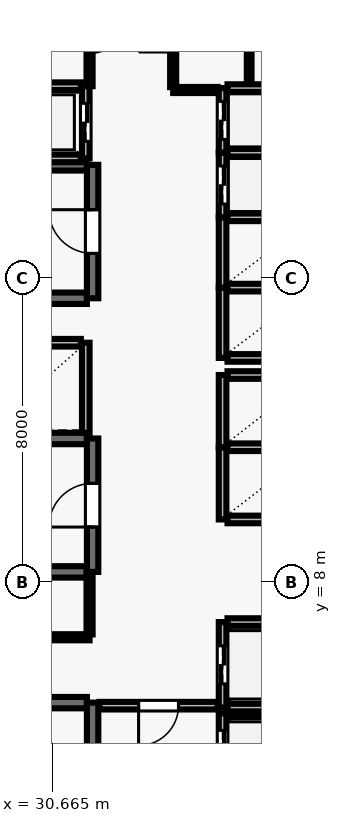
"""IFC4 building model, lengths in metres.
Left out: names, types, materials, properties, quantities, classifications, styles, units other than length and angle.
Written with IfcOpenShell. Run it as: python <this file> out.ifc"""

import sys

from ifc_helpers import new_model, si_unit, direction, frame, frame_2d, origin, place, context, subcontext, project, spatial, rectangle, extrude, element, fill, save


model = new_model("IFC4")
c1 = context("Model", 3, precision=1e-05, world=origin(), true_north=direction((0.0, 1.0)))
c2 = subcontext(c1, "Body", "Model", "MODEL_VIEW")
j1 = project(units=[si_unit("LENGTHUNIT", "METRE"), si_unit("PLANEANGLEUNIT", "RADIAN")], contexts=[c1])
p1 = place(None, origin())
s1 = spatial("IfcSite", under=j1, at=p1, CompositionType="ELEMENT")
p2 = place(p1, origin())
s2 = spatial("IfcBuilding", under=s1, at=p2, CompositionType="ELEMENT")
p3 = place(p2, frame((0.0, 0.0, 134.6)))
s3 = spatial("IfcBuildingStorey", under=s2, at=p3, CompositionType="ELEMENT", Elevation=134.6)
p4 = place(p3, frame((31.58, 4.83, 0.0), z_axis=(0.0, 0.0, 1.0), x_axis=(-1.0, 0.0, 0.0)))
e1 = element("IfcWall", 1, at=p4, inside=s3, PredefinedType="SHEAR", context=c2, shape_type="SweptSolid", body=[
    extrude(rectangle(XDim=8.36, YDim=0.3, at=frame_2d((4.18, 0.0))), origin(), (0.0, 0.0, 1.0), 3.69),
])
p5 = place(p3, frame((31.73, 0.96, 0.0), z_axis=(0.0, 0.0, 1.0), x_axis=(0.0, 1.0, 0.0)))
e2 = element("IfcWall", 2, at=p5, inside=s3, PredefinedType="SHEAR", context=c2, shape_type="SweptSolid", body=[
    extrude(rectangle(XDim=3.87, YDim=0.3, at=frame_2d((1.935, 0.0))), origin(), (0.0, 0.0, 1.0), 3.69),
])
p6 = place(p5, frame((1.54, 0.0, 0.0)))
e3 = element("IfcOpeningElement", 3, at=p6, cuts=e2, PredefinedType="OPENING", context=c2, shape_type="SweptSolid", body=[
    extrude(rectangle(XDim=1.15, YDim=2.15, at=frame_2d((0.575, 1.075))), frame((0.0, 0.16, 0.0), z_axis=(0.0, -1.0, 0.0), x_axis=(1.0, 0.0, 0.0)), (0.0, 0.0, 1.0), 0.32),
])
for number, where, z_axis, x_axis in (
    (4, (31.58, 18.98, 0.0), (0.0, 0.0, 1.0), (-1.0, 0.0, 0.0)),
    (5, (23.22, 15.47, 0.0), (0.0, 0.0, 1.0), (1.0, 0.0, 0.0)),
):
    element("IfcWall", number, at=place(p3, frame(where, z_axis=z_axis, x_axis=x_axis)), inside=s3, PredefinedType="SHEAR", context=c2, shape_type="SweptSolid", body=[
        extrude(rectangle(XDim=8.36, YDim=0.3, at=frame_2d((4.18, 0.0))), origin(), (0.0, 0.0, 1.0), 3.69),
    ])
p7 = place(p3, frame((31.73, 15.47, 0.0), z_axis=(0.0, 0.0, 1.0), x_axis=(0.0, 1.0, 0.0)))
e6 = element("IfcWall", 6, at=p7, inside=s3, PredefinedType="SHEAR", context=c2, shape_type="SweptSolid", body=[
    extrude(rectangle(XDim=3.51, YDim=0.3, at=frame_2d((1.755, 0.0))), origin(), (0.0, 0.0, 1.0), 3.69),
])
p8 = place(p7, frame((1.18, 0.0, 0.0)))
e7 = element("IfcOpeningElement", 7, at=p8, cuts=e6, PredefinedType="OPENING", context=c2, shape_type="SweptSolid", body=[
    extrude(rectangle(XDim=1.15, YDim=2.15, at=frame_2d((0.575, 1.075))), frame((0.0, 0.16, 0.0), z_axis=(0.0, -1.0, 0.0), x_axis=(1.0, 0.0, 0.0)), (0.0, 0.0, 1.0), 0.32),
])
for number, where, z_axis, x_axis in (
    (8, (31.58, 11.78, 0.0), (0.0, 0.0, 1.0), (-1.0, 0.0, 0.0)),
    (9, (23.22, 8.27, 0.0), (0.0, 0.0, 1.0), (1.0, 0.0, 0.0)),
):
    element("IfcWall", number, at=place(p3, frame(where, z_axis=z_axis, x_axis=x_axis)), inside=s3, PredefinedType="SHEAR", context=c2, shape_type="SweptSolid", body=[
        extrude(rectangle(XDim=8.36, YDim=0.3, at=frame_2d((4.18, 0.0))), origin(), (0.0, 0.0, 1.0), 3.69),
    ])
p9 = place(p3, frame((31.73, 8.27, 0.0), z_axis=(0.0, 0.0, 1.0), x_axis=(0.0, 1.0, 0.0)))
e10 = element("IfcWall", 10, at=p9, inside=s3, PredefinedType="SHEAR", context=c2, shape_type="SweptSolid", body=[
    extrude(rectangle(XDim=3.51, YDim=0.3, at=frame_2d((1.755, 0.0))), origin(), (0.0, 0.0, 1.0), 3.69),
])
p10 = place(p9, frame((1.18, 0.0, 0.0)))
e11 = element("IfcOpeningElement", 11, at=p10, cuts=e10, PredefinedType="OPENING", context=c2, shape_type="SweptSolid", body=[
    extrude(rectangle(XDim=1.15, YDim=2.15, at=frame_2d((0.575, 1.075))), frame((0.0, 0.16, 0.0), z_axis=(0.0, -1.0, 0.0), x_axis=(1.0, 0.0, 0.0)), (0.0, 0.0, 1.0), 0.32),
])
p11 = place(p3, frame((35.15, 4.55, 0.0), z_axis=(0.0, 0.0, 1.0), x_axis=(0.0, -1.0, 0.0)))
e12 = element("IfcWall", 12, at=p11, inside=s3, PredefinedType="SOLIDWALL", context=c2, shape_type="SweptSolid", body=[
    extrude(rectangle(XDim=2.1, YDim=0.2, at=frame_2d((1.05, 0.0))), origin(), (0.0, 0.0, 1.0), 3.69),
])
p12 = place(p11, frame((0.45, 0.0, 0.0)))
e13 = element("IfcOpeningElement", 13, at=p12, cuts=e12, PredefinedType="OPENING", context=c2, shape_type="SweptSolid", body=[
    extrude(rectangle(XDim=1.2, YDim=2.15, at=frame_2d((0.6, 1.075))), frame((0.0, 0.11, 0.0), z_axis=(0.0, -1.0, 0.0), x_axis=(1.0, 0.0, 0.0)), (0.0, 0.0, 1.0), 0.22),
])
p13 = place(p3, frame((37.42, 4.55, 0.0), z_axis=(0.0, 0.0, 1.0), x_axis=(-1.0, 0.0, 0.0)))
e14 = element("IfcWall", 14, at=p13, inside=s3, PredefinedType="SOLIDWALL", context=c2, shape_type="SweptSolid", body=[
    extrude(rectangle(XDim=2.14, YDim=0.2, at=frame_2d((1.07, 0.0))), origin(), (0.0, 0.0, 1.0), 3.69),
])
p14 = place(p3, frame((35.15, 6.95, 0.0), z_axis=(0.0, 0.0, 1.0), x_axis=(0.0, -1.0, 0.0)))
e15 = element("IfcWall", 15, at=p14, inside=s3, PredefinedType="SOLIDWALL", context=c2, shape_type="SweptSolid", body=[
    extrude(rectangle(XDim=2.25, YDim=0.2, at=frame_2d((1.125, 0.0))), origin(), (0.0, 0.0, 1.0), 3.69),
])
p15 = place(p14, frame((0.625, 0.0, 0.0)))
e16 = element("IfcOpeningElement", 16, at=p15, cuts=e15, PredefinedType="OPENING", context=c2, shape_type="SweptSolid", body=[
    extrude(rectangle(XDim=1.0, YDim=2.1, at=frame_2d((0.5, 1.05))), frame((0.0, 0.11, 0.0), z_axis=(0.0, -1.0, 0.0), x_axis=(1.0, 0.0, 0.0)), (0.0, 0.0, 1.0), 0.22),
])
for number, where, z_axis, x_axis in (
    (17, (35.28, 4.7, 0.0), (0.0, 0.0, 1.0), (1.0, 0.0, 0.0)),
    (18, (37.42, 6.95, 0.0), (0.0, 0.0, 1.0), (-1.0, 0.0, 0.0)),
):
    element("IfcWall", number, at=place(p3, frame(where, z_axis=z_axis, x_axis=x_axis)), inside=s3, PredefinedType="SOLIDWALL", context=c2, shape_type="SweptSolid", body=[
        extrude(rectangle(XDim=2.14, YDim=0.2, at=frame_2d((1.07, 0.0))), origin(), (0.0, 0.0, 1.0), 3.69),
    ])
p16 = place(p3, frame((35.15, 11.55, 0.0), z_axis=(0.0, 0.0, 1.0), x_axis=(0.0, -1.0, 0.0)))
e19 = element("IfcWall", 19, at=p16, inside=s3, PredefinedType="SOLIDWALL", context=c2, shape_type="SweptSolid", body=[
    extrude(rectangle(XDim=1.9, YDim=0.2, at=frame_2d((0.95, 0.0))), origin(), (0.0, 0.0, 1.0), 3.69),
])
for number, where, z_axis, x_axis in (
    (20, (35.28, 9.65, 0.0), (0.0, 0.0, 1.0), (1.0, 0.0, 0.0)),
    (21, (37.42, 11.55, 0.0), (0.0, 0.0, 1.0), (-1.0, 0.0, 0.0)),
):
    element("IfcWall", number, at=place(p3, frame(where, z_axis=z_axis, x_axis=x_axis)), inside=s3, PredefinedType="SOLIDWALL", context=c2, shape_type="SweptSolid", body=[
        extrude(rectangle(XDim=2.14, YDim=0.2, at=frame_2d((1.07, 0.0))), origin(), (0.0, 0.0, 1.0), 3.69),
    ])
p17 = place(p3, frame((35.15, 13.45, 0.0), z_axis=(0.0, 0.0, 1.0), x_axis=(0.0, -1.0, 0.0)))
e22 = element("IfcWall", 22, at=p17, inside=s3, PredefinedType="SOLIDWALL", context=c2, shape_type="SweptSolid", body=[
    extrude(rectangle(XDim=1.9, YDim=0.2, at=frame_2d((0.95, 0.0))), origin(), (0.0, 0.0, 1.0), 3.69),
])
p18 = place(p3, frame((37.42, 13.45, 0.0), z_axis=(0.0, 0.0, 1.0), x_axis=(-1.0, 0.0, 0.0)))
e23 = element("IfcWall", 23, at=p18, inside=s3, PredefinedType="SOLIDWALL", context=c2, shape_type="SweptSolid", body=[
    extrude(rectangle(XDim=2.14, YDim=0.2, at=frame_2d((1.07, 0.0))), origin(), (0.0, 0.0, 1.0), 3.69),
])
p19 = place(p3, frame((31.55, 11.93, 0.0), z_axis=(0.0, 0.0, 1.0), x_axis=(0.0, 1.0, 0.0)))
e24 = element("IfcWall", 24, at=p19, inside=s3, PredefinedType="SOLIDWALL", context=c2, shape_type="SweptSolid", body=[
    extrude(rectangle(XDim=2.37, YDim=0.2, at=frame_2d((1.185, 0.0))), origin(), (0.0, 0.0, 1.0), 3.69),
])
p20 = place(p3, frame((31.42, 14.3, 0.0), z_axis=(0.0, 0.0, 1.0), x_axis=(-1.0, 0.0, 0.0)))
e25 = element("IfcWall", 25, at=p20, inside=s3, PredefinedType="SOLIDWALL", context=c2, shape_type="SweptSolid", body=[
    extrude(rectangle(XDim=2.44, YDim=0.2, at=frame_2d((1.22, 0.0))), origin(), (0.0, 0.0, 1.0), 3.69),
])
p21 = place(p3, frame((35.15, 15.75, 0.0), z_axis=(0.0, 0.0, 1.0), x_axis=(0.0, -1.0, 0.0)))
e26 = element("IfcWall", 26, at=p21, inside=s3, PredefinedType="SOLIDWALL", context=c2, shape_type="SweptSolid", body=[
    extrude(rectangle(XDim=1.85, YDim=0.2, at=frame_2d((0.925, 0.0))), origin(), (0.0, 0.0, 1.0), 3.69),
])
for number, where, z_axis, x_axis in (
    (27, (35.28, 13.9, 0.0), (0.0, 0.0, 1.0), (1.0, 0.0, 0.0)),
    (28, (37.42, 15.75, 0.0), (0.0, 0.0, 1.0), (-1.0, 0.0, 0.0)),
):
    element("IfcWall", number, at=place(p3, frame(where, z_axis=z_axis, x_axis=x_axis)), inside=s3, PredefinedType="SOLIDWALL", context=c2, shape_type="SweptSolid", body=[
        extrude(rectangle(XDim=2.14, YDim=0.2, at=frame_2d((1.07, 0.0))), origin(), (0.0, 0.0, 1.0), 3.69),
    ])
p22 = place(p3, frame((35.15, 17.6, 0.0), z_axis=(0.0, 0.0, 1.0), x_axis=(0.0, -1.0, 0.0)))
e29 = element("IfcWall", 29, at=p22, inside=s3, PredefinedType="SOLIDWALL", context=c2, shape_type="SweptSolid", body=[
    extrude(rectangle(XDim=1.85, YDim=0.2, at=frame_2d((0.925, 0.0))), origin(), (0.0, 0.0, 1.0), 3.69),
])
p23 = place(p3, frame((37.42, 17.6, 0.0), z_axis=(0.0, 0.0, 1.0), x_axis=(-1.0, 0.0, 0.0)))
e30 = element("IfcWall", 30, at=p23, inside=s3, PredefinedType="SOLIDWALL", context=c2, shape_type="SweptSolid", body=[
    extrude(rectangle(XDim=2.14, YDim=0.2, at=frame_2d((1.07, 0.0))), origin(), (0.0, 0.0, 1.0), 3.69),
])
p24 = place(p3, frame((35.15, 19.3, 0.0), z_axis=(0.0, 0.0, 1.0), x_axis=(0.0, -1.0, 0.0)))
e31 = element("IfcWall", 31, at=p24, inside=s3, PredefinedType="SOLIDWALL", context=c2, shape_type="SweptSolid", body=[
    extrude(rectangle(XDim=1.7, YDim=0.2, at=frame_2d((0.85, 0.0))), origin(), (0.0, 0.0, 1.0), 3.69),
])
p25 = place(p24, frame((0.35, 0.0, 0.0)))
e32 = element("IfcOpeningElement", 32, at=p25, cuts=e31, PredefinedType="OPENING", context=c2, shape_type="SweptSolid", body=[
    extrude(rectangle(XDim=1.0, YDim=2.1, at=frame_2d((0.5, 1.05))), frame((0.0, 0.11, 0.0), z_axis=(0.0, -1.0, 0.0), x_axis=(1.0, 0.0, 0.0)), (0.0, 0.0, 1.0), 0.22),
])
p26 = place(p3, frame((37.42, 19.3, 0.0), z_axis=(0.0, 0.0, 1.0), x_axis=(-1.0, 0.0, 0.0)))
e33 = element("IfcWall", 33, at=p26, inside=s3, PredefinedType="SOLIDWALL", context=c2, shape_type="SweptSolid", body=[
    extrude(rectangle(XDim=2.14, YDim=0.2, at=frame_2d((1.07, 0.0))), origin(), (0.0, 0.0, 1.0), 3.69),
])
p27 = place(p3, frame((35.15, 21.0, 0.0), z_axis=(0.0, 0.0, 1.0), x_axis=(0.0, -1.0, 0.0)))
e34 = element("IfcWall", 34, at=p27, inside=s3, PredefinedType="SOLIDWALL", context=c2, shape_type="SweptSolid", body=[
    extrude(rectangle(XDim=1.7, YDim=0.2, at=frame_2d((0.85, 0.0))), origin(), (0.0, 0.0, 1.0), 3.69),
])
p28 = place(p27, frame((0.35, 0.0, 0.0)))
e35 = element("IfcOpeningElement", 35, at=p28, cuts=e34, PredefinedType="OPENING", context=c2, shape_type="SweptSolid", body=[
    extrude(rectangle(XDim=1.0, YDim=2.1, at=frame_2d((0.5, 1.05))), frame((0.0, 0.11, 0.0), z_axis=(0.0, -1.0, 0.0), x_axis=(1.0, 0.0, 0.0)), (0.0, 0.0, 1.0), 0.22),
])
p29 = place(p3, frame((37.42, 21.0, 0.0), z_axis=(0.0, 0.0, 1.0), x_axis=(-1.0, 0.0, 0.0)))
e36 = element("IfcWall", 36, at=p29, inside=s3, PredefinedType="SOLIDWALL", context=c2, shape_type="SweptSolid", body=[
    extrude(rectangle(XDim=2.14, YDim=0.2, at=frame_2d((1.07, 0.0))), origin(), (0.0, 0.0, 1.0), 3.69),
])
p30 = place(p3, frame((31.55, 19.15, 0.0), z_axis=(0.0, 0.0, 1.0), x_axis=(0.0, 1.0, 0.0)))
e37 = element("IfcWall", 37, at=p30, inside=s3, PredefinedType="SOLIDWALL", context=c2, shape_type="SweptSolid", body=[
    extrude(rectangle(XDim=1.9, YDim=0.2, at=frame_2d((0.95, 0.0))), origin(), (0.0, 0.0, 1.0), 3.69),
])
p31 = place(p30, frame((0.45, 0.0, 0.0)))
e38 = element("IfcOpeningElement", 38, at=p31, cuts=e37, PredefinedType="OPENING", context=c2, shape_type="SweptSolid", body=[
    extrude(rectangle(XDim=1.0, YDim=2.1, at=frame_2d((0.5, 1.05))), frame((0.0, 0.11, 0.0), z_axis=(0.0, -1.0, 0.0), x_axis=(1.0, 0.0, 0.0)), (0.0, 0.0, 1.0), 0.22),
])
for number, where, z_axis, x_axis in (
    (39, (28.98, 19.15, 0.0), (0.0, 0.0, 1.0), (1.0, 0.0, 0.0)),
    (40, (31.42, 21.05, 0.0), (0.0, 0.0, 1.0), (-1.0, 0.0, 0.0)),
):
    element("IfcWall", number, at=place(p3, frame(where, z_axis=z_axis, x_axis=x_axis)), inside=s3, PredefinedType="SOLIDWALL", context=c2, shape_type="SweptSolid", body=[
        extrude(rectangle(XDim=2.44, YDim=0.2, at=frame_2d((1.22, 0.0))), origin(), (0.0, 0.0, 1.0), 3.69),
    ])
p32 = place(p3, frame((31.65, 6.55, 0.0), z_axis=(0.0, 0.0, 1.0), x_axis=(-1.0, 0.0, 0.0)))
e41 = element("IfcWall", 41, at=p32, inside=s3, PredefinedType="PARTITIONING", context=c2, shape_type="SweptSolid", body=[
    extrude(rectangle(XDim=4.75, YDim=0.16, at=frame_2d((2.375, 0.0))), origin(), (0.0, 0.0, 1.0), 3.69),
])
p33 = place(p32, frame((1.935, 0.0, 0.0)))
e42 = element("IfcOpeningElement", 42, at=p33, cuts=e41, PredefinedType="OPENING", context=c2, shape_type="SweptSolid", body=[
    extrude(rectangle(XDim=0.88, YDim=2.1, at=frame_2d((0.44, 1.05))), frame((0.0, 0.09, 0.0), z_axis=(0.0, -1.0, 0.0), x_axis=(1.0, 0.0, 0.0)), (0.0, 0.0, 1.0), 0.18),
])
p34 = place(p3, frame((35.02, 4.75, 0.0), z_axis=(0.0, 0.0, 1.0), x_axis=(-1.0, 0.0, 0.0)))
e43 = element("IfcWall", 43, at=p34, inside=s3, PredefinedType="SOLIDWALL", context=c2, shape_type="SweptSolid", body=[
    extrude(rectangle(XDim=3.11, YDim=0.2, at=frame_2d((1.555, 0.0))), origin(), (0.0, 0.0, 1.0), 3.69),
])
p35 = place(p34, frame((1.03, 0.0, 0.0)))
e44 = element("IfcOpeningElement", 44, at=p35, cuts=e43, PredefinedType="OPENING", context=c2, shape_type="SweptSolid", body=[
    extrude(rectangle(XDim=1.05, YDim=2.15, at=frame_2d((0.525, 1.075))), frame((0.0, 0.11, 0.0), z_axis=(0.0, -1.0, 0.0), x_axis=(1.0, 0.0, 0.0)), (0.0, 0.0, 1.0), 0.22),
])
p36 = place(p3, frame((35.02, 20.95, 0.0), z_axis=(0.0, 0.0, 1.0), x_axis=(-1.0, 0.0, 0.0)))
e45 = element("IfcWall", 45, at=p36, inside=s3, PredefinedType="PARTITIONING", context=c2, shape_type="SweptSolid", body=[
    extrude(rectangle(XDim=1.17, YDim=0.16, at=frame_2d((0.585, 0.0))), origin(), (0.0, 0.0, 1.0), 3.69),
])
p37 = place(p3, frame((31.65, 8.24, 0.0), z_axis=(0.0, 0.0, 1.0), x_axis=(0.0, -1.0, 0.0)))
e46 = element("IfcWall", 46, at=p37, inside=s3, PredefinedType="PARTITIONING", context=c2, shape_type="SweptSolid", body=[
    extrude(rectangle(XDim=1.615, YDim=0.16, at=frame_2d((0.808, 0.0))), origin(), (0.0, 0.0, 1.0), 3.69),
])
p38 = place(p3, frame((31.65, 23.775, 0.0), z_axis=(0.0, 0.0, 1.0), x_axis=(0.0, -1.0, 0.0)))
e47 = element("IfcWall", 47, at=p38, inside=s3, PredefinedType="PARTITIONING", context=c2, shape_type="SweptSolid", body=[
    extrude(rectangle(XDim=2.725, YDim=0.16, at=frame_2d((1.362, 0.0))), origin(), (0.0, 0.0, 1.0), 3.69),
])
p39 = place(p38, frame((0.862, 0.0, 0.0)))
e48 = element("IfcOpeningElement", 48, at=p39, cuts=e47, PredefinedType="OPENING", context=c2, shape_type="SweptSolid", body=[
    extrude(rectangle(XDim=1.0, YDim=2.1, at=frame_2d((0.5, 1.05))), frame((0.0, 0.09, 0.0), z_axis=(0.0, -1.0, 0.0), x_axis=(1.0, 0.0, 0.0)), (0.0, 0.0, 1.0), 0.18),
])
p40 = place(p3, frame((33.85, 21.025, 0.0), z_axis=(0.0, 0.0, 1.0), x_axis=(0.0, 1.0, 0.0)))
e49 = element("IfcWall", 49, at=p40, inside=s3, PredefinedType="PARTITIONING", context=c2, shape_type="SweptSolid", body=[
    extrude(rectangle(XDim=2.75, YDim=0.16, at=frame_2d((1.375, 0.0))), origin(), (0.0, 0.0, 1.0), 3.69),
])
p41 = place(p40, frame((0.925, 0.0, 0.0)))
e50 = element("IfcOpeningElement", 50, at=p41, cuts=e49, PredefinedType="OPENING", context=c2, shape_type="SweptSolid", body=[
    extrude(rectangle(XDim=0.9, YDim=2.1, at=frame_2d((0.45, 1.05))), frame((0.0, 0.09, 0.0), z_axis=(0.0, -1.0, 0.0), x_axis=(1.0, 0.0, 0.0)), (0.0, 0.0, 1.0), 0.18),
])
p42 = place(p3, frame((35.85, 21.13, 0.0), z_axis=(0.0, 0.0, 1.0), x_axis=(0.0, 1.0, 0.0)))
e51 = element("IfcWall", 51, at=p42, inside=s3, PredefinedType="PARTITIONING", context=c2, shape_type="SweptSolid", body=[
    extrude(rectangle(XDim=2.645, YDim=0.125, at=frame_2d((1.323, 0.0))), origin(), (0.0, 0.0, 1.0), 3.69),
])
p43 = place(p42, frame((0.872, 0.0, 0.0)))
e52 = element("IfcOpeningElement", 52, at=p43, cuts=e51, PredefinedType="OPENING", context=c2, shape_type="SweptSolid", body=[
    extrude(rectangle(XDim=0.9, YDim=2.1, at=frame_2d((0.45, 1.05))), frame((0.0, 0.073, 0.0), z_axis=(0.0, -1.0, 0.0), x_axis=(1.0, 0.0, 0.0)), (0.0, 0.0, 1.0), 0.145),
])
p44 = place(p8, origin())
e53 = element("IfcDoor", 53, at=p44, inside=s3, OperationType="SINGLE_SWING_RIGHT", PredefinedType="DOOR", context=c2, shape_type="SweptSolid", body=[
    extrude(rectangle(XDim=1.15, YDim=2.15, at=frame_2d((0.575, 1.075))), frame((0.0, 0.025, 0.0), z_axis=(0.0, -1.0, 0.0), x_axis=(1.0, 0.0, 0.0)), (0.0, 0.0, 1.0), 0.05),
])
fill(e7, e53)
p45 = place(p10, origin())
e54 = element("IfcDoor", 54, at=p45, inside=s3, OperationType="SINGLE_SWING_LEFT", PredefinedType="DOOR", context=c2, shape_type="SweptSolid", body=[
    extrude(rectangle(XDim=1.15, YDim=2.15, at=frame_2d((0.575, 1.075))), frame((0.0, 0.025, 0.0), z_axis=(0.0, -1.0, 0.0), x_axis=(1.0, 0.0, 0.0)), (0.0, 0.0, 1.0), 0.05),
])
fill(e11, e54)
p46 = place(p12, origin())
e55 = element("IfcDoor", 55, at=p46, inside=s3, OperationType="DOUBLE_DOOR_SLIDING", PredefinedType="DOOR", context=c2, shape_type="SweptSolid", body=[
    extrude(rectangle(XDim=1.2, YDim=2.15, at=frame_2d((0.6, 1.075))), frame((0.0, 0.025, 0.0), z_axis=(0.0, -1.0, 0.0), x_axis=(1.0, 0.0, 0.0)), (0.0, 0.0, 1.0), 0.05),
])
fill(e13, e55)
p47 = place(p15, origin())
e56 = element("IfcDoor", 56, at=p47, inside=s3, OperationType="DOUBLE_DOOR_SLIDING", PredefinedType="DOOR", context=c2, shape_type="SweptSolid", body=[
    extrude(rectangle(XDim=1.0, YDim=2.1, at=frame_2d((0.5, 1.05))), frame((0.0, 0.025, 0.0), z_axis=(0.0, -1.0, 0.0), x_axis=(1.0, 0.0, 0.0)), (0.0, 0.0, 1.0), 0.05),
])
fill(e16, e56)
p48 = place(p25, origin())
e57 = element("IfcDoor", 57, at=p48, inside=s3, OperationType="DOUBLE_DOOR_SLIDING", PredefinedType="DOOR", context=c2, shape_type="SweptSolid", body=[
    extrude(rectangle(XDim=1.0, YDim=2.1, at=frame_2d((0.5, 1.05))), frame((0.0, 0.025, 0.0), z_axis=(0.0, -1.0, 0.0), x_axis=(1.0, 0.0, 0.0)), (0.0, 0.0, 1.0), 0.05),
])
fill(e32, e57)
p49 = place(p28, origin())
e58 = element("IfcDoor", 58, at=p49, inside=s3, OperationType="DOUBLE_DOOR_SLIDING", PredefinedType="DOOR", context=c2, shape_type="SweptSolid", body=[
    extrude(rectangle(XDim=1.0, YDim=2.1, at=frame_2d((0.5, 1.05))), frame((0.0, 0.025, 0.0), z_axis=(0.0, -1.0, 0.0), x_axis=(1.0, 0.0, 0.0)), (0.0, 0.0, 1.0), 0.05),
])
fill(e35, e58)
p50 = place(p31, origin())
e59 = element("IfcDoor", 59, at=p50, inside=s3, OperationType="DOUBLE_DOOR_SLIDING", PredefinedType="DOOR", context=c2, shape_type="SweptSolid", body=[
    extrude(rectangle(XDim=1.0, YDim=2.1, at=frame_2d((0.5, 1.05))), frame((0.0, 0.025, 0.0), z_axis=(0.0, -1.0, 0.0), x_axis=(1.0, 0.0, 0.0)), (0.0, 0.0, 1.0), 0.05),
])
fill(e38, e59)
p51 = place(p35, origin())
e60 = element("IfcDoor", 60, at=p51, inside=s3, OperationType="SINGLE_SWING_RIGHT", PredefinedType="DOOR", context=c2, shape_type="SweptSolid", body=[
    extrude(rectangle(XDim=1.05, YDim=2.15, at=frame_2d((0.525, 1.075))), frame((0.0, 0.025, 0.0), z_axis=(0.0, -1.0, 0.0), x_axis=(1.0, 0.0, 0.0)), (0.0, 0.0, 1.0), 0.05),
])
fill(e44, e60)
p52 = place(p39, origin())
e61 = element("IfcDoor", 61, at=p52, inside=s3, OperationType="SINGLE_SWING_LEFT", PredefinedType="DOOR", context=c2, shape_type="SweptSolid", body=[
    extrude(rectangle(XDim=1.0, YDim=2.1, at=frame_2d((0.5, 1.05))), frame((0.0, 0.025, 0.0), z_axis=(0.0, -1.0, 0.0), x_axis=(1.0, 0.0, 0.0)), (0.0, 0.0, 1.0), 0.05),
])
fill(e48, e61)
save(model, sys.argv[1])
